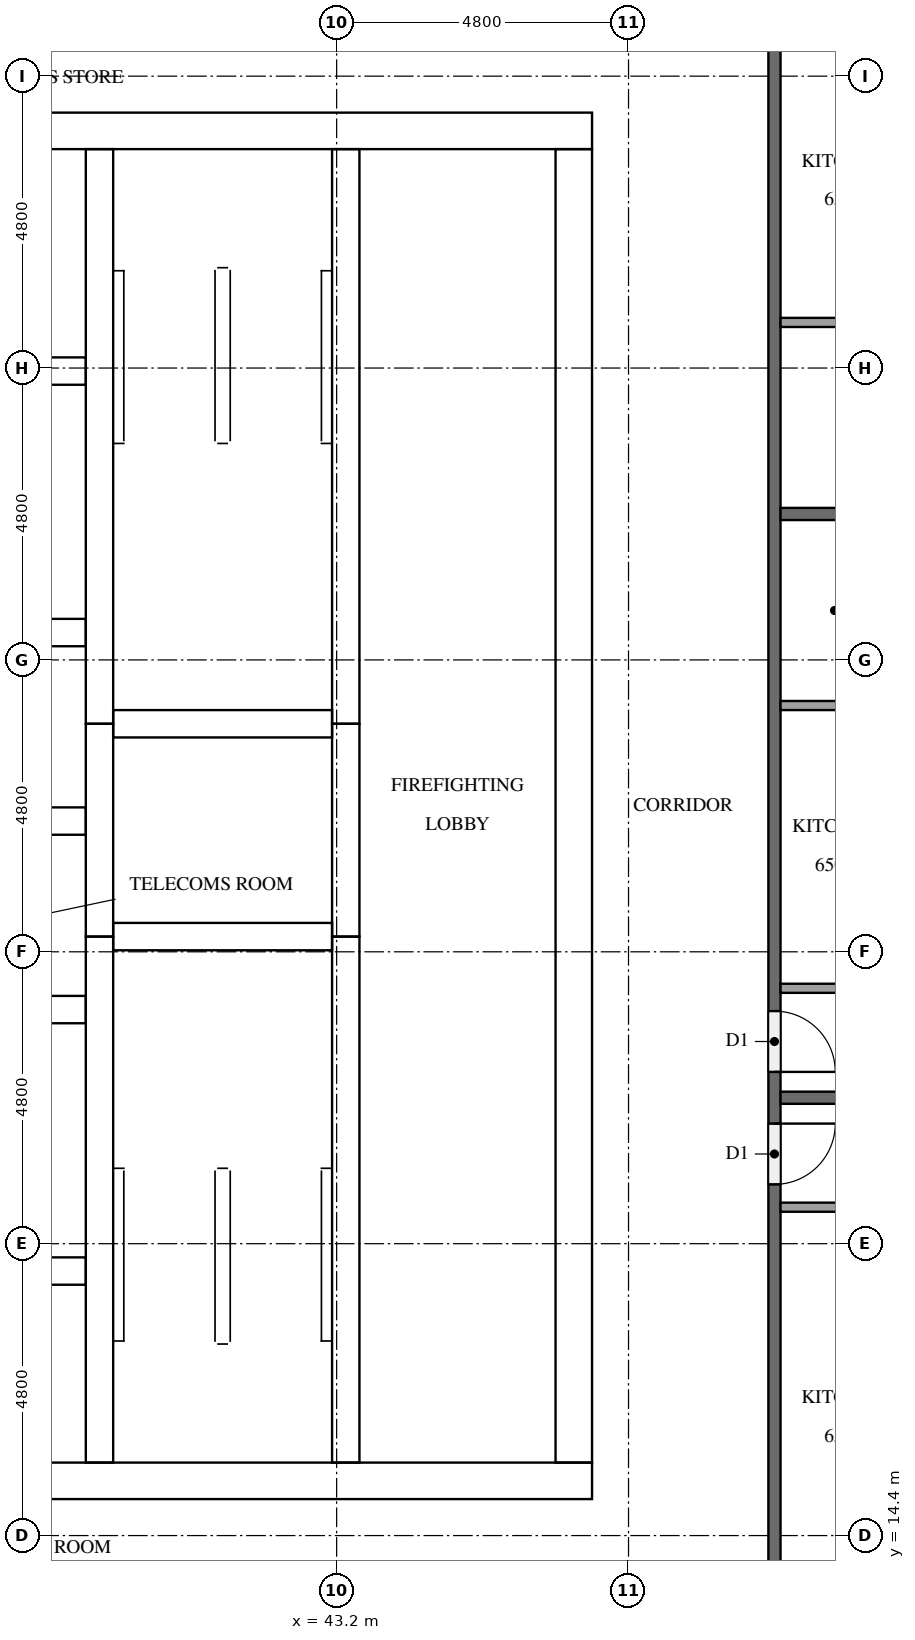
"""IFC4 building model, lengths in metres.
Left out: names, types, materials, properties, quantities, classifications, styles, units other than length and angle.
Written with IfcOpenShell. Run it as: python <this file> out.ifc"""

import sys

from ifc_helpers import new_model, si_unit, direction, frame, frame_2d, origin, place, context, subcontext, project, spatial, rectangle, extrude, element, fill, save


model = new_model("IFC4")
c1 = context("Model", 3, precision=1e-05, world=origin(), true_north=direction((0.0, 1.0)))
c2 = subcontext(c1, "Body", "Model", "MODEL_VIEW")
j1 = project(units=[si_unit("LENGTHUNIT", "METRE"), si_unit("PLANEANGLEUNIT", "RADIAN")], contexts=[c1])
p1 = place(None, origin())
s1 = spatial("IfcSite", under=j1, at=p1, CompositionType="ELEMENT")
p2 = place(p1, origin())
s2 = spatial("IfcBuilding", under=s1, at=p2, CompositionType="ELEMENT")
p3 = place(p2, frame((0.0, 0.0, 249.2)))
s3 = spatial("IfcBuildingStorey", under=s2, at=p3, CompositionType="ELEMENT", Elevation=249.2)
p4 = place(p3, frame((15.0, 15.3, 0.0), z_axis=(0.0, 0.0, 1.0), x_axis=(1.0, 0.0, 0.0)))
e1 = element("IfcWall", 1, at=p4, inside=s3, PredefinedType="SHEAR", context=c2, shape_type="SweptSolid", body=[
    extrude(rectangle(XDim=32.4, YDim=0.6, at=frame_2d((16.2, 0.0))), origin(), (0.0, 0.0, 1.0), 3.2),
])
p5 = place(p4, frame((15.3, 0.0, 0.0)))
e2 = element("IfcOpeningElement", 2, at=p5, cuts=e1, PredefinedType="OPENING", context=c2, shape_type="SweptSolid", body=[
    extrude(rectangle(XDim=1.8, YDim=2.1, at=frame_2d((0.9, 1.05))), frame((0.0, 0.31, 0.0), z_axis=(0.0, -1.0, 0.0), x_axis=(1.0, 0.0, 0.0)), (0.0, 0.0, 1.0), 0.62),
])
p6 = place(p3, frame((15.0, 37.5, 0.0), z_axis=(0.0, 0.0, 1.0), x_axis=(1.0, 0.0, 0.0)))
e3 = element("IfcWall", 3, at=p6, inside=s3, PredefinedType="SHEAR", context=c2, shape_type="SweptSolid", body=[
    extrude(rectangle(XDim=32.4, YDim=0.6, at=frame_2d((16.2, 0.0))), origin(), (0.0, 0.0, 1.0), 3.2),
])
p7 = place(p6, frame((15.3, 0.0, 0.0)))
e4 = element("IfcOpeningElement", 4, at=p7, cuts=e3, PredefinedType="OPENING", context=c2, shape_type="SweptSolid", body=[
    extrude(rectangle(XDim=1.8, YDim=2.1, at=frame_2d((0.9, 1.05))), frame((0.0, 0.31, 0.0), z_axis=(0.0, -1.0, 0.0), x_axis=(1.0, 0.0, 0.0)), (0.0, 0.0, 1.0), 0.62),
])
p8 = place(p6, frame((1.25, 0.0, 0.0)))
e5 = element("IfcOpeningElement", 5, at=p8, cuts=e3, PredefinedType="OPENING", context=c2, shape_type="SweptSolid", body=[
    extrude(rectangle(XDim=1.0, YDim=2.1, at=frame_2d((0.5, 1.05))), frame((0.0, 0.31, 0.0), z_axis=(0.0, -1.0, 0.0), x_axis=(1.0, 0.0, 0.0)), (0.0, 0.0, 1.0), 0.62),
])
p9 = place(p6, frame((4.988, 0.0, 0.0)))
e6 = element("IfcOpeningElement", 6, at=p9, cuts=e3, PredefinedType="OPENING", context=c2, shape_type="SweptSolid", body=[
    extrude(rectangle(XDim=1.0, YDim=2.1, at=frame_2d((0.5, 1.05))), frame((0.0, 0.31, 0.0), z_axis=(0.0, -1.0, 0.0), x_axis=(1.0, 0.0, 0.0)), (0.0, 0.0, 1.0), 0.62),
])
p10 = place(p3, frame((47.1, 15.6, 0.0), z_axis=(0.0, 0.0, 1.0), x_axis=(0.0, 1.0, 0.0)))
e7 = element("IfcWall", 7, at=p10, inside=s3, PredefinedType="SHEAR", context=c2, shape_type="SweptSolid", body=[
    extrude(rectangle(XDim=21.6, YDim=0.6, at=frame_2d((10.8, 0.0))), origin(), (0.0, 0.0, 1.0), 3.2),
])
p11 = place(p10, frame((10.5, 0.0, 0.0)))
e8 = element("IfcOpeningElement", 8, at=p11, cuts=e7, PredefinedType="OPENING", context=c2, shape_type="SweptSolid", body=[
    extrude(rectangle(XDim=1.2, YDim=2.1, at=frame_2d((0.6, 1.05))), frame((0.0, 0.31, 0.0), z_axis=(0.0, -1.0, 0.0), x_axis=(1.0, 0.0, 0.0)), (0.0, 0.0, 1.0), 0.62),
])
p12 = place(p3, frame((39.3, 15.6, 0.0), z_axis=(0.0, 0.0, 1.0), x_axis=(0.0, 1.0, 0.0)))
e9 = element("IfcWall", 9, at=p12, inside=s3, PredefinedType="SHEAR", context=c2, shape_type="SweptSolid", body=[
    extrude(rectangle(XDim=8.65, YDim=0.45, at=frame_2d((4.325, 0.0))), origin(), (0.0, 0.0, 1.0), 3.2),
])
p13 = place(p3, frame((39.3, 24.25, 0.0), z_axis=(0.0, 0.0, 1.0), x_axis=(0.0, 1.0, 0.0)))
e10 = element("IfcWall", 10, at=p13, inside=s3, PredefinedType="SHEAR", context=c2, shape_type="SweptSolid", body=[
    extrude(rectangle(XDim=3.5, YDim=0.45, at=frame_2d((1.75, 0.0))), origin(), (0.0, 0.0, 1.0), 3.2),
])
p14 = place(p3, frame((39.3, 27.75, 0.0), z_axis=(0.0, 0.0, 1.0), x_axis=(0.0, 1.0, 0.0)))
e11 = element("IfcWall", 11, at=p14, inside=s3, PredefinedType="SHEAR", context=c2, shape_type="SweptSolid", body=[
    extrude(rectangle(XDim=9.45, YDim=0.45, at=frame_2d((4.725, 0.0))), origin(), (0.0, 0.0, 1.0), 3.2),
])
p15 = place(p3, frame((43.35, 15.6, 0.0), z_axis=(0.0, 0.0, 1.0), x_axis=(0.0, 1.0, 0.0)))
e12 = element("IfcWall", 12, at=p15, inside=s3, PredefinedType="SHEAR", context=c2, shape_type="SweptSolid", body=[
    extrude(rectangle(XDim=8.65, YDim=0.45, at=frame_2d((4.325, 0.0))), origin(), (0.0, 0.0, 1.0), 3.2),
])
p16 = place(p15, frame((0.6, 0.0, 0.0)))
e13 = element("IfcOpeningElement", 13, at=p16, cuts=e12, PredefinedType="OPENING", context=c2, shape_type="SweptSolid", body=[
    extrude(rectangle(XDim=1.2, YDim=2.1, at=frame_2d((0.6, 1.05))), frame((0.0, 0.235, 0.0), z_axis=(0.0, -1.0, 0.0), x_axis=(1.0, 0.0, 0.0)), (0.0, 0.0, 1.0), 0.47),
])
p17 = place(p3, frame((43.35, 24.25, 0.0), z_axis=(0.0, 0.0, 1.0), x_axis=(0.0, 1.0, 0.0)))
e14 = element("IfcWall", 14, at=p17, inside=s3, PredefinedType="SHEAR", context=c2, shape_type="SweptSolid", body=[
    extrude(rectangle(XDim=3.5, YDim=0.45, at=frame_2d((1.75, 0.0))), origin(), (0.0, 0.0, 1.0), 3.2),
])
p18 = place(p17, frame((1.2, 0.0, 0.0)))
e15 = element("IfcOpeningElement", 15, at=p18, cuts=e14, PredefinedType="OPENING", context=c2, shape_type="SweptSolid", body=[
    extrude(rectangle(XDim=1.1, YDim=2.1, at=frame_2d((0.55, 1.05))), frame((0.0, 0.235, 0.0), z_axis=(0.0, -1.0, 0.0), x_axis=(1.0, 0.0, 0.0)), (0.0, 0.0, 1.0), 0.47),
])
p19 = place(p3, frame((43.35, 27.75, 0.0), z_axis=(0.0, 0.0, 1.0), x_axis=(0.0, 1.0, 0.0)))
e16 = element("IfcWall", 16, at=p19, inside=s3, PredefinedType="SHEAR", context=c2, shape_type="SweptSolid", body=[
    extrude(rectangle(XDim=9.45, YDim=0.45, at=frame_2d((4.725, 0.0))), origin(), (0.0, 0.0, 1.0), 3.2),
])
p20 = place(p19, frame((7.65, 0.0, 0.0)))
e17 = element("IfcOpeningElement", 17, at=p20, cuts=e16, PredefinedType="OPENING", context=c2, shape_type="SweptSolid", body=[
    extrude(rectangle(XDim=1.2, YDim=2.1, at=frame_2d((0.6, 1.05))), frame((0.0, 0.235, 0.0), z_axis=(0.0, -1.0, 0.0), x_axis=(1.0, 0.0, 0.0)), (0.0, 0.0, 1.0), 0.47),
])
for number, where, z_axis, x_axis in (
    (18, (39.525, 24.25, 0.0), (0.0, 0.0, 1.0), (1.0, 0.0, 0.0)),
    (19, (39.525, 27.75, 0.0), (0.0, 0.0, 1.0), (1.0, 0.0, 0.0)),
):
    element("IfcWall", number, at=place(p3, frame(where, z_axis=z_axis, x_axis=x_axis)), inside=s3, PredefinedType="SHEAR", context=c2, shape_type="SweptSolid", body=[
        extrude(rectangle(XDim=3.6, YDim=0.45, at=frame_2d((1.8, 0.0))), origin(), (0.0, 0.0, 1.0), 3.2),
    ])
p21 = place(p3, frame((33.475, 18.75, 0.0), z_axis=(0.0, 0.0, 1.0), x_axis=(1.0, 0.0, 0.0)))
e20 = element("IfcWall", 20, at=p21, inside=s3, PredefinedType="SHEAR", context=c2, shape_type="SweptSolid", body=[
    extrude(rectangle(XDim=5.6, YDim=0.45, at=frame_2d((2.8, 0.0))), origin(), (0.0, 0.0, 1.0), 3.2),
])
p22 = place(p21, frame((1.497, 0.0, 0.0)))
e21 = element("IfcOpeningElement", 21, at=p22, cuts=e20, PredefinedType="OPENING", context=c2, shape_type="SweptSolid", body=[
    extrude(rectangle(XDim=1.0, YDim=2.1, at=frame_2d((0.5, 1.05))), frame((0.0, 0.235, 0.0), z_axis=(0.0, -1.0, 0.0), x_axis=(1.0, 0.0, 0.0)), (0.0, 0.0, 1.0), 0.47),
])
p23 = place(p21, frame((4.171, 0.0, 0.0)))
e22 = element("IfcOpeningElement", 22, at=p23, cuts=e20, PredefinedType="OPENING", context=c2, shape_type="SweptSolid", body=[
    extrude(rectangle(XDim=1.0, YDim=2.1, at=frame_2d((0.5, 1.05))), frame((0.0, 0.235, 0.0), z_axis=(0.0, -1.0, 0.0), x_axis=(1.0, 0.0, 0.0)), (0.0, 0.0, 1.0), 0.47),
])
p24 = place(p3, frame((23.325, 23.05, 0.0), z_axis=(0.0, 0.0, 1.0), x_axis=(1.0, 0.0, 0.0)))
e23 = element("IfcWall", 23, at=p24, inside=s3, PredefinedType="SHEAR", context=c2, shape_type="SweptSolid", body=[
    extrude(rectangle(XDim=15.75, YDim=0.45, at=frame_2d((7.875, 0.0))), origin(), (0.0, 0.0, 1.0), 3.2),
])
p25 = place(p24, frame((2.058, 0.0, 0.0)))
e24 = element("IfcOpeningElement", 24, at=p25, cuts=e23, PredefinedType="OPENING", context=c2, shape_type="SweptSolid", body=[
    extrude(rectangle(XDim=1.0, YDim=2.1, at=frame_2d((0.5, 1.05))), frame((0.0, 0.235, 0.0), z_axis=(0.0, -1.0, 0.0), x_axis=(1.0, 0.0, 0.0)), (0.0, 0.0, 1.0), 0.47),
])
p26 = place(p24, frame((11.823, 0.0, 0.0)))
e25 = element("IfcOpeningElement", 25, at=p26, cuts=e23, PredefinedType="OPENING", context=c2, shape_type="SweptSolid", body=[
    extrude(rectangle(XDim=1.0, YDim=2.1, at=frame_2d((0.5, 1.05))), frame((0.0, 0.235, 0.0), z_axis=(0.0, -1.0, 0.0), x_axis=(1.0, 0.0, 0.0)), (0.0, 0.0, 1.0), 0.47),
])
p27 = place(p24, frame((14.481, 0.0, 0.0)))
e26 = element("IfcOpeningElement", 26, at=p27, cuts=e23, PredefinedType="OPENING", context=c2, shape_type="SweptSolid", body=[
    extrude(rectangle(XDim=1.0, YDim=2.1, at=frame_2d((0.5, 1.05))), frame((0.0, 0.235, 0.0), z_axis=(0.0, -1.0, 0.0), x_axis=(1.0, 0.0, 0.0)), (0.0, 0.0, 1.0), 0.47),
])
p28 = place(p3, frame((23.325, 26.15, 0.0), z_axis=(0.0, 0.0, 1.0), x_axis=(1.0, 0.0, 0.0)))
e27 = element("IfcWall", 27, at=p28, inside=s3, PredefinedType="SHEAR", context=c2, shape_type="SweptSolid", body=[
    extrude(rectangle(XDim=15.75, YDim=0.45, at=frame_2d((7.875, 0.0))), origin(), (0.0, 0.0, 1.0), 3.2),
])
p29 = place(p3, frame((23.325, 29.25, 0.0), z_axis=(0.0, 0.0, 1.0), x_axis=(1.0, 0.0, 0.0)))
e28 = element("IfcWall", 28, at=p29, inside=s3, PredefinedType="SHEAR", context=c2, shape_type="SweptSolid", body=[
    extrude(rectangle(XDim=15.75, YDim=0.45, at=frame_2d((7.875, 0.0))), origin(), (0.0, 0.0, 1.0), 3.2),
])
p30 = place(p29, frame((0.679, 0.0, 0.0)))
e29 = element("IfcOpeningElement", 29, at=p30, cuts=e28, PredefinedType="OPENING", context=c2, shape_type="SweptSolid", body=[
    extrude(rectangle(XDim=1.1, YDim=2.1, at=frame_2d((0.55, 1.05))), frame((0.0, 0.235, 0.0), z_axis=(0.0, -1.0, 0.0), x_axis=(1.0, 0.0, 0.0)), (0.0, 0.0, 1.0), 0.47),
])
p31 = place(p29, frame((3.337, 0.0, 0.0)))
e30 = element("IfcOpeningElement", 30, at=p31, cuts=e28, PredefinedType="OPENING", context=c2, shape_type="SweptSolid", body=[
    extrude(rectangle(XDim=1.1, YDim=2.1, at=frame_2d((0.55, 1.05))), frame((0.0, 0.235, 0.0), z_axis=(0.0, -1.0, 0.0), x_axis=(1.0, 0.0, 0.0)), (0.0, 0.0, 1.0), 0.47),
])
p32 = place(p29, frame((5.996, 0.0, 0.0)))
e31 = element("IfcOpeningElement", 31, at=p32, cuts=e28, PredefinedType="OPENING", context=c2, shape_type="SweptSolid", body=[
    extrude(rectangle(XDim=1.1, YDim=2.1, at=frame_2d((0.55, 1.05))), frame((0.0, 0.235, 0.0), z_axis=(0.0, -1.0, 0.0), x_axis=(1.0, 0.0, 0.0)), (0.0, 0.0, 1.0), 0.47),
])
p33 = place(p29, frame((8.654, 0.0, 0.0)))
e32 = element("IfcOpeningElement", 32, at=p33, cuts=e28, PredefinedType="OPENING", context=c2, shape_type="SweptSolid", body=[
    extrude(rectangle(XDim=1.1, YDim=2.1, at=frame_2d((0.55, 1.05))), frame((0.0, 0.235, 0.0), z_axis=(0.0, -1.0, 0.0), x_axis=(1.0, 0.0, 0.0)), (0.0, 0.0, 1.0), 0.47),
])
p34 = place(p29, frame((11.312, 0.0, 0.0)))
e33 = element("IfcOpeningElement", 33, at=p34, cuts=e28, PredefinedType="OPENING", context=c2, shape_type="SweptSolid", body=[
    extrude(rectangle(XDim=1.1, YDim=2.1, at=frame_2d((0.55, 1.05))), frame((0.0, 0.235, 0.0), z_axis=(0.0, -1.0, 0.0), x_axis=(1.0, 0.0, 0.0)), (0.0, 0.0, 1.0), 0.47),
])
p35 = place(p29, frame((13.971, 0.0, 0.0)))
e34 = element("IfcOpeningElement", 34, at=p35, cuts=e28, PredefinedType="OPENING", context=c2, shape_type="SweptSolid", body=[
    extrude(rectangle(XDim=1.1, YDim=2.1, at=frame_2d((0.55, 1.05))), frame((0.0, 0.235, 0.0), z_axis=(0.0, -1.0, 0.0), x_axis=(1.0, 0.0, 0.0)), (0.0, 0.0, 1.0), 0.47),
])
p36 = place(p3, frame((33.475, 33.55, 0.0), z_axis=(0.0, 0.0, 1.0), x_axis=(1.0, 0.0, 0.0)))
e35 = element("IfcWall", 35, at=p36, inside=s3, PredefinedType="SHEAR", context=c2, shape_type="SweptSolid", body=[
    extrude(rectangle(XDim=5.6, YDim=0.45, at=frame_2d((2.8, 0.0))), origin(), (0.0, 0.0, 1.0), 3.2),
])
p37 = place(p36, frame((1.651, 0.0, 0.0)))
e36 = element("IfcOpeningElement", 36, at=p37, cuts=e35, PredefinedType="OPENING", context=c2, shape_type="SweptSolid", body=[
    extrude(rectangle(XDim=1.0, YDim=2.1, at=frame_2d((0.5, 1.05))), frame((0.0, 0.235, 0.0), z_axis=(0.0, -1.0, 0.0), x_axis=(1.0, 0.0, 0.0)), (0.0, 0.0, 1.0), 0.47),
])
p38 = place(p36, frame((4.326, 0.0, 0.0)))
e37 = element("IfcOpeningElement", 37, at=p38, cuts=e35, PredefinedType="OPENING", context=c2, shape_type="SweptSolid", body=[
    extrude(rectangle(XDim=1.0, YDim=2.1, at=frame_2d((0.5, 1.05))), frame((0.0, 0.235, 0.0), z_axis=(0.0, -1.0, 0.0), x_axis=(1.0, 0.0, 0.0)), (0.0, 0.0, 1.0), 0.47),
])
p39 = place(p3, frame((50.4, 40.7, 0.0), z_axis=(0.0, 0.0, 1.0), x_axis=(0.0, -1.0, 0.0)))
e38 = element("IfcWall", 38, at=p39, inside=s3, PredefinedType="PARTITIONING", context=c2, shape_type="SweptSolid", body=[
    extrude(rectangle(XDim=28.6, YDim=0.2, at=frame_2d((14.3, 0.0))), origin(), (0.0, 0.0, 1.0), 3.2),
])
p40 = place(p39, frame((19.525, 0.0, 0.0)))
e39 = element("IfcOpeningElement", 39, at=p40, cuts=e38, PredefinedType="OPENING", context=c2, shape_type="SweptSolid", body=[
    extrude(rectangle(XDim=1.0, YDim=2.1, at=frame_2d((0.5, 1.05))), frame((0.0, 0.11, 0.0), z_axis=(0.0, -1.0, 0.0), x_axis=(1.0, 0.0, 0.0)), (0.0, 0.0, 1.0), 0.22),
])
p41 = place(p39, frame((17.675, 0.0, 0.0)))
e40 = element("IfcOpeningElement", 40, at=p41, cuts=e38, PredefinedType="OPENING", context=c2, shape_type="SweptSolid", body=[
    extrude(rectangle(XDim=1.0, YDim=2.1, at=frame_2d((0.5, 1.05))), frame((0.0, 0.11, 0.0), z_axis=(0.0, -1.0, 0.0), x_axis=(1.0, 0.0, 0.0)), (0.0, 0.0, 1.0), 0.22),
])
p42 = place(p39, frame((0.325, 0.0, 0.0)))
e41 = element("IfcOpeningElement", 41, at=p42, cuts=e38, PredefinedType="OPENING", context=c2, shape_type="SweptSolid", body=[
    extrude(rectangle(XDim=1.0, YDim=2.1, at=frame_2d((0.5, 1.05))), frame((0.0, 0.11, 0.0), z_axis=(0.0, -1.0, 0.0), x_axis=(1.0, 0.0, 0.0)), (0.0, 0.0, 1.0), 0.22),
])
for number, where, z_axis, x_axis in (
    (42, (50.5, 21.6, 0.0), (0.0, 0.0, 1.0), (1.0, 0.0, 0.0)),
    (43, (50.5, 31.2, 0.0), (0.0, 0.0, 1.0), (1.0, 0.0, 0.0)),
):
    element("IfcWall", number, at=place(p3, frame(where, z_axis=z_axis, x_axis=x_axis)), inside=s3, PredefinedType="PARTITIONING", context=c2, shape_type="SweptSolid", body=[
        extrude(rectangle(XDim=7.0, YDim=0.2, at=frame_2d((3.5, 0.0))), origin(), (0.0, 0.0, 1.0), 3.2),
    ])
p43 = place(p3, frame((50.5, 19.8, 0.0), z_axis=(0.0, 0.0, 1.0), x_axis=(1.0, 0.0, 0.0)))
e44 = element("IfcWall", 44, at=p43, inside=s3, PredefinedType="PARTITIONING", context=c2, shape_type="SweptSolid", body=[
    extrude(rectangle(XDim=2.225, YDim=0.15, at=frame_2d((1.113, 0.0))), origin(), (0.0, 0.0, 1.0), 3.2),
])
p44 = place(p3, frame((50.5, 28.05, 0.0), z_axis=(0.0, 0.0, 1.0), x_axis=(1.0, 0.0, 0.0)))
e45 = element("IfcWall", 45, at=p44, inside=s3, PredefinedType="PARTITIONING", context=c2, shape_type="SweptSolid", body=[
    extrude(rectangle(XDim=1.775, YDim=0.15, at=frame_2d((0.887, 0.0))), origin(), (0.0, 0.0, 1.0), 3.2),
])
p45 = place(p3, frame((50.5, 23.4, 0.0), z_axis=(0.0, 0.0, 1.0), x_axis=(1.0, 0.0, 0.0)))
e46 = element("IfcWall", 46, at=p45, inside=s3, PredefinedType="PARTITIONING", context=c2, shape_type="SweptSolid", body=[
    extrude(rectangle(XDim=1.925, YDim=0.15, at=frame_2d((0.962, 0.0))), origin(), (0.0, 0.0, 1.0), 3.2),
])
p46 = place(p3, frame((50.5, 34.35, 0.0), z_axis=(0.0, 0.0, 1.0), x_axis=(1.0, 0.0, 0.0)))
e47 = element("IfcWall", 47, at=p46, inside=s3, PredefinedType="PARTITIONING", context=c2, shape_type="SweptSolid", body=[
    extrude(rectangle(XDim=2.075, YDim=0.15, at=frame_2d((1.038, 0.0))), origin(), (0.0, 0.0, 1.0), 3.2),
])
p47 = place(p18, origin())
e48 = element("IfcDoor", 48, at=p47, inside=s3, OperationType="DOUBLE_DOOR_SLIDING", PredefinedType="DOOR", context=c2, shape_type="SweptSolid", body=[
    extrude(rectangle(XDim=1.1, YDim=2.1, at=frame_2d((0.55, 1.05))), frame((0.0, 0.025, 0.0), z_axis=(0.0, -1.0, 0.0), x_axis=(1.0, 0.0, 0.0)), (0.0, 0.0, 1.0), 0.05),
])
fill(e15, e48)
p48 = place(p16, origin())
e49 = element("IfcDoor", 49, at=p48, inside=s3, OperationType="SINGLE_SWING_RIGHT", PredefinedType="DOOR", context=c2, shape_type="SweptSolid", body=[
    extrude(rectangle(XDim=1.2, YDim=2.1, at=frame_2d((0.6, 1.05))), frame((0.0, 0.025, 0.0), z_axis=(0.0, -1.0, 0.0), x_axis=(1.0, 0.0, 0.0)), (0.0, 0.0, 1.0), 0.05),
])
fill(e13, e49)
p49 = place(p20, origin())
e50 = element("IfcDoor", 50, at=p49, inside=s3, OperationType="SINGLE_SWING_LEFT", PredefinedType="DOOR", context=c2, shape_type="SweptSolid", body=[
    extrude(rectangle(XDim=1.2, YDim=2.1, at=frame_2d((0.6, 1.05))), frame((0.0, 0.025, 0.0), z_axis=(0.0, -1.0, 0.0), x_axis=(1.0, 0.0, 0.0)), (0.0, 0.0, 1.0), 0.05),
])
fill(e17, e50)
p50 = place(p11, origin())
e51 = element("IfcDoor", 51, at=p50, inside=s3, OperationType="SINGLE_SWING_LEFT", PredefinedType="DOOR", context=c2, shape_type="SweptSolid", body=[
    extrude(rectangle(XDim=1.2, YDim=2.1, at=frame_2d((0.6, 1.05))), frame((0.0, 0.025, 0.0), z_axis=(0.0, -1.0, 0.0), x_axis=(1.0, 0.0, 0.0)), (0.0, 0.0, 1.0), 0.05),
])
fill(e8, e51)
p51 = place(p27, frame((1.0, 0.0, 0.0), z_axis=(0.0, 0.0, 1.0), x_axis=(-1.0, 0.0, 0.0)))
e52 = element("IfcDoor", 52, at=p51, inside=s3, OperationType="SINGLE_SWING_RIGHT", PredefinedType="DOOR", context=c2, shape_type="SweptSolid", body=[
    extrude(rectangle(XDim=1.0, YDim=2.1, at=frame_2d((0.5, 1.05))), frame((0.0, 0.025, 0.0), z_axis=(0.0, -1.0, 0.0), x_axis=(1.0, 0.0, 0.0)), (0.0, 0.0, 1.0), 0.05),
])
fill(e26, e52)
p52 = place(p23, origin())
e53 = element("IfcDoor", 53, at=p52, inside=s3, OperationType="SINGLE_SWING_RIGHT", PredefinedType="DOOR", context=c2, shape_type="SweptSolid", body=[
    extrude(rectangle(XDim=1.0, YDim=2.1, at=frame_2d((0.5, 1.05))), frame((0.0, 0.025, 0.0), z_axis=(0.0, -1.0, 0.0), x_axis=(1.0, 0.0, 0.0)), (0.0, 0.0, 1.0), 0.05),
])
fill(e22, e53)
p53 = place(p38, frame((1.0, 0.0, 0.0), z_axis=(0.0, 0.0, 1.0), x_axis=(-1.0, 0.0, 0.0)))
e54 = element("IfcDoor", 54, at=p53, inside=s3, OperationType="SINGLE_SWING_RIGHT", PredefinedType="DOOR", context=c2, shape_type="SweptSolid", body=[
    extrude(rectangle(XDim=1.0, YDim=2.1, at=frame_2d((0.5, 1.05))), frame((0.0, 0.025, 0.0), z_axis=(0.0, -1.0, 0.0), x_axis=(1.0, 0.0, 0.0)), (0.0, 0.0, 1.0), 0.05),
])
fill(e37, e54)
p54 = place(p40, origin())
e55 = element("IfcDoor", 55, at=p54, inside=s3, OperationType="SINGLE_SWING_LEFT", PredefinedType="DOOR", context=c2, shape_type="SweptSolid", body=[
    extrude(rectangle(XDim=1.0, YDim=2.1, at=frame_2d((0.5, 1.05))), frame((0.0, 0.025, 0.0), z_axis=(0.0, -1.0, 0.0), x_axis=(1.0, 0.0, 0.0)), (0.0, 0.0, 1.0), 0.05),
])
fill(e39, e55)
p55 = place(p41, origin())
e56 = element("IfcDoor", 56, at=p55, inside=s3, OperationType="SINGLE_SWING_RIGHT", PredefinedType="DOOR", context=c2, shape_type="SweptSolid", body=[
    extrude(rectangle(XDim=1.0, YDim=2.1, at=frame_2d((0.5, 1.05))), frame((0.0, 0.025, 0.0), z_axis=(0.0, -1.0, 0.0), x_axis=(1.0, 0.0, 0.0)), (0.0, 0.0, 1.0), 0.05),
])
fill(e40, e56)
save(model, sys.argv[1])
